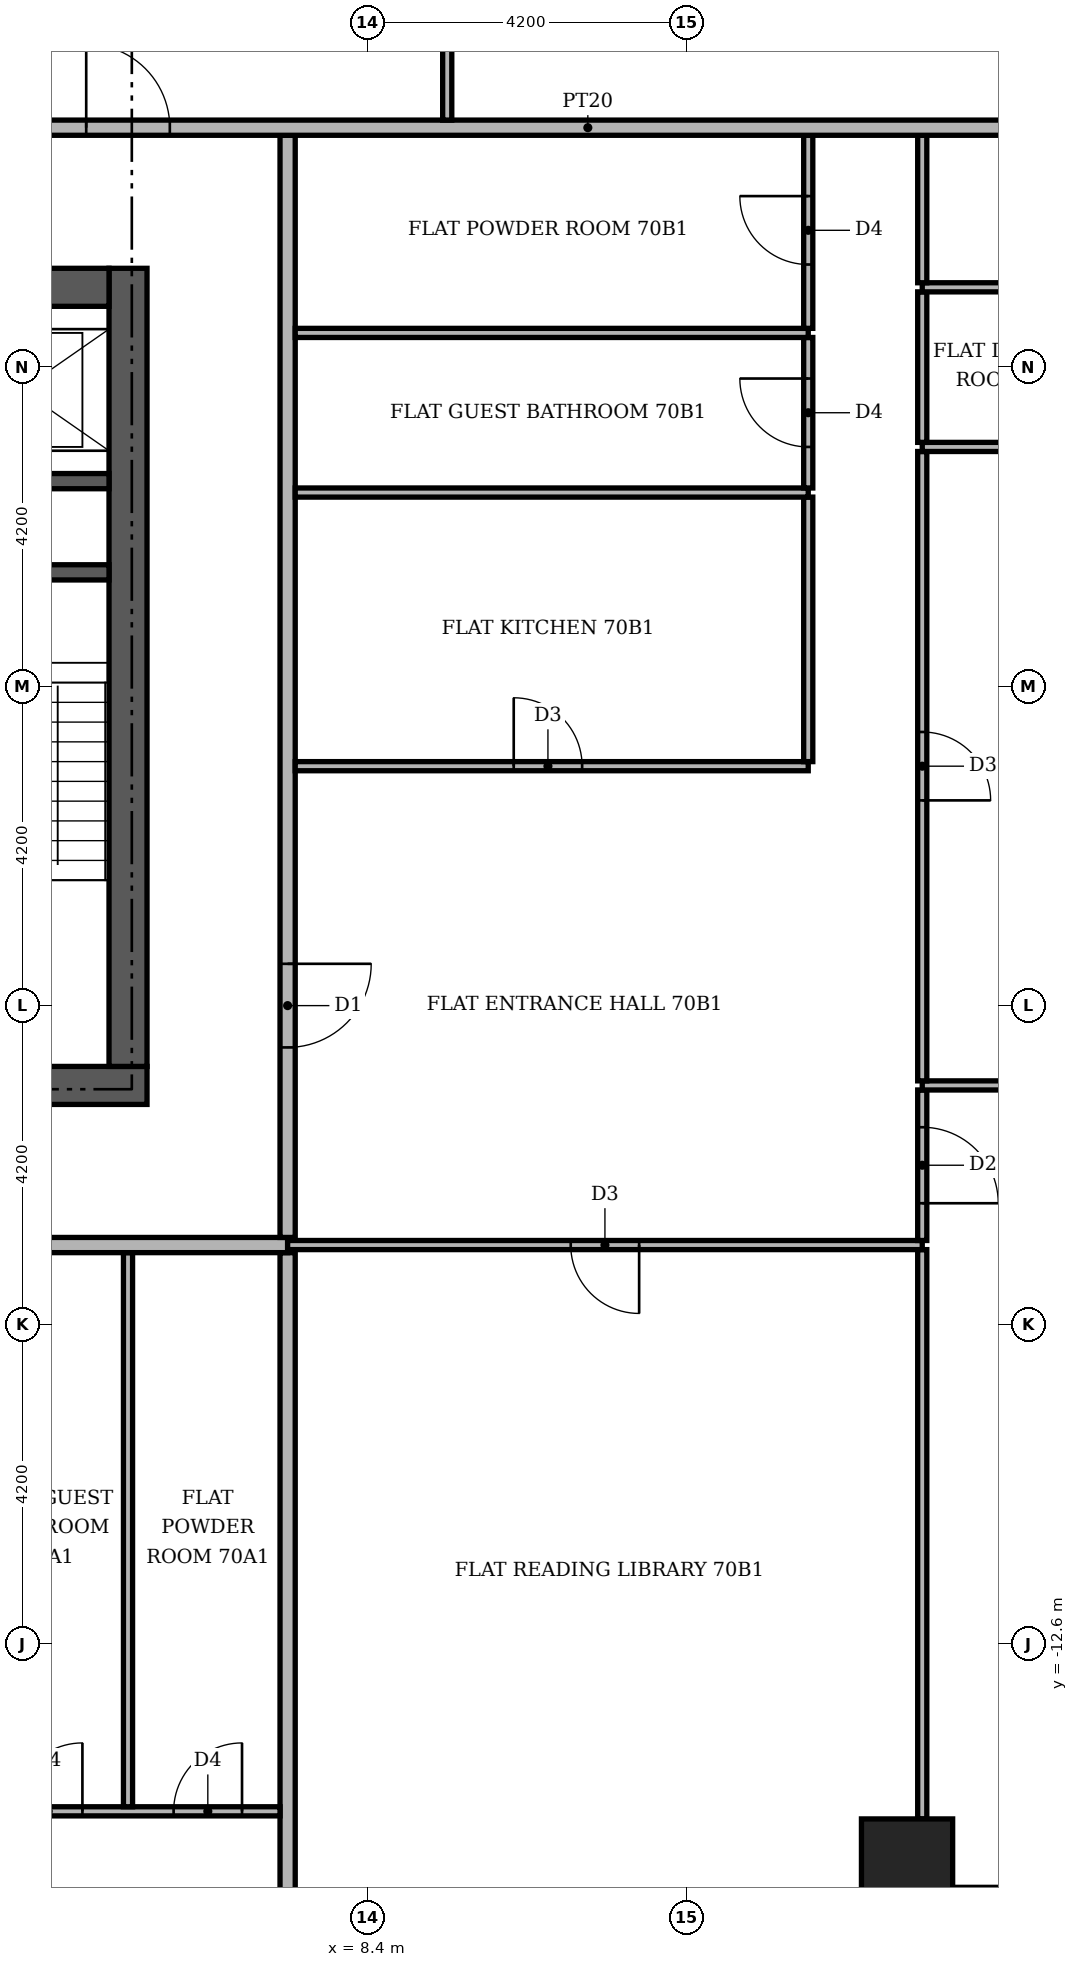
"""IFC4 building model, lengths in metres.
Left out: names, types, materials, properties, quantities, classifications, styles, units other than length and angle.
Written with IfcOpenShell. Run it as: python <this file> out.ifc"""

import sys

from ifc_helpers import new_model, si_unit, direction, frame, frame_2d, origin, origin_2d, place, context, subcontext, project, spatial, rectangle, extrude, element, fill, save


model = new_model("IFC4")
c1 = context("Model", 3, precision=1e-05, world=origin(), true_north=direction((0.0, 1.0)))
c2 = subcontext(c1, "Body", "Model", "MODEL_VIEW")
j1 = project(units=[si_unit("LENGTHUNIT", "METRE"), si_unit("PLANEANGLEUNIT", "RADIAN")], contexts=[c1])
p1 = place(None, origin())
s1 = spatial("IfcSite", under=j1, at=p1, CompositionType="ELEMENT")
p2 = place(p1, origin())
s2 = spatial("IfcBuilding", under=s1, at=p2, CompositionType="ELEMENT")
p3 = place(p2, frame((0.0, 0.0, 292.8)))
s3 = spatial("IfcBuildingStorey", under=s2, at=p3, CompositionType="ELEMENT", Elevation=292.8)
p4 = place(p3, frame((-5.5, -5.25, 0.0), z_axis=(0.0, 0.0, 1.0), x_axis=(1.0, 0.0, 0.0)))
e1 = element("IfcWall", 1, at=p4, inside=s3, PredefinedType="SHEAR", context=c2, shape_type="SweptSolid", body=[
    extrude(rectangle(XDim=11.0, YDim=0.5, at=frame_2d((5.5, 0.0))), origin(), (0.0, 0.0, 1.0), 3.55),
])
p5 = place(p4, frame((4.9, 0.0, 0.0)))
e2 = element("IfcOpeningElement", 2, at=p5, cuts=e1, PredefinedType="OPENING", context=c2, shape_type="SweptSolid", body=[
    extrude(rectangle(XDim=1.2, YDim=2.1, at=frame_2d((0.6, 1.05))), frame((0.0, 0.26, 0.0), z_axis=(0.0, -1.0, 0.0), x_axis=(1.0, 0.0, 0.0)), (0.0, 0.0, 1.0), 0.52),
])
p6 = place(p3, frame((5.25, -5.0, 0.0), z_axis=(0.0, 0.0, 1.0), x_axis=(0.0, 1.0, 0.0)))
e3 = element("IfcWall", 3, at=p6, inside=s3, PredefinedType="SHEAR", context=c2, shape_type="SweptSolid", body=[
    extrude(rectangle(XDim=10.5, YDim=0.5, at=frame_2d((5.25, 0.0))), origin(), (0.0, 0.0, 1.0), 3.55),
])
p7 = place(p3, frame((-5.0, 5.25, 0.0), z_axis=(0.0, 0.0, 1.0), x_axis=(1.0, 0.0, 0.0)))
e4 = element("IfcWall", 4, at=p7, inside=s3, PredefinedType="SHEAR", context=c2, shape_type="SweptSolid", body=[
    extrude(rectangle(XDim=10.0, YDim=0.5, at=frame_2d((5.0, 0.0))), origin(), (0.0, 0.0, 1.0), 3.55),
])
p8 = place(p7, frame((4.4, 0.0, 0.0)))
e5 = element("IfcOpeningElement", 5, at=p8, cuts=e4, PredefinedType="OPENING", context=c2, shape_type="SweptSolid", body=[
    extrude(rectangle(XDim=1.2, YDim=2.1, at=frame_2d((0.6, 1.05))), frame((0.0, 0.26, 0.0), z_axis=(0.0, -1.0, 0.0), x_axis=(1.0, 0.0, 0.0)), (0.0, 0.0, 1.0), 0.52),
])
for number, where, z_axis, x_axis in (
    (6, (2.15, 1.5, 0.0), (0.0, 0.0, 1.0), (1.0, 0.0, 0.0)),
    (7, (2.15, 2.7, 0.0), (0.0, 0.0, 1.0), (1.0, 0.0, 0.0)),
):
    element("IfcWall", number, at=place(p3, frame(where, z_axis=z_axis, x_axis=x_axis)), inside=s3, PredefinedType="SHEAR", context=c2, shape_type="SweptSolid", body=[
        extrude(rectangle(XDim=2.85, YDim=0.2, at=frame_2d((1.425, 0.0))), origin(), (0.0, 0.0, 1.0), 3.55),
    ])
p9 = place(p3, frame((15.5, -15.5, -0.35), z_axis=(0.0, 0.0, 1.0), x_axis=(1.0, 0.0, 0.0)))
e8 = element("IfcColumn", 8, at=p9, inside=s3, PredefinedType="COLUMN", context=c2, shape_type="SweptSolid", body=[
    extrude(rectangle(XDim=1.2, YDim=1.2, at=origin_2d()), origin(), (0.0, 0.0, 1.0), 4.25),
])
p10 = place(p3, frame((7.35, -21.3, 0.0), z_axis=(0.0, 0.0, 1.0), x_axis=(0.0, 1.0, 0.0)))
e9 = element("IfcWall", 9, at=p10, inside=s3, PredefinedType="PARTITIONING", context=c2, shape_type="SweptSolid", body=[
    extrude(rectangle(XDim=13.85, YDim=0.2, at=frame_2d((6.925, 0.0))), origin(), (0.0, 0.0, 1.0), 3.55),
])
p11 = place(p3, frame((15.7, -14.9, 0.0), z_axis=(0.0, 0.0, 1.0), x_axis=(0.0, 1.0, 0.0)))
e10 = element("IfcWall", 10, at=p11, inside=s3, PredefinedType="PARTITIONING", context=c2, shape_type="SweptSolid", body=[
    extrude(rectangle(XDim=7.49, YDim=0.12, at=frame_2d((3.745, 0.0))), origin(), (0.0, 0.0, 1.0), 3.55),
])
p12 = place(p3, frame((-1.05, -14.8, 0.0), z_axis=(0.0, 0.0, 1.0), x_axis=(1.0, 0.0, 0.0)))
e11 = element("IfcWall", 11, at=p12, inside=s3, PredefinedType="PARTITIONING", context=c2, shape_type="SweptSolid", body=[
    extrude(rectangle(XDim=8.3, YDim=0.12, at=frame_2d((4.15, 0.0))), origin(), (0.0, 0.0, 1.0), 3.55),
])
p13 = place(p12, frame((4.8, 0.0, 0.0)))
e12 = element("IfcOpeningElement", 12, at=p13, cuts=e11, PredefinedType="OPENING", context=c2, shape_type="SweptSolid", body=[
    extrude(rectangle(XDim=0.9, YDim=2.1, at=frame_2d((0.45, 1.05))), frame((0.0, 0.07, 0.0), z_axis=(0.0, -1.0, 0.0), x_axis=(1.0, 0.0, 0.0)), (0.0, 0.0, 1.0), 0.14),
])
p14 = place(p12, frame((6.9, 0.0, 0.0)))
e13 = element("IfcOpeningElement", 13, at=p14, cuts=e11, PredefinedType="OPENING", context=c2, shape_type="SweptSolid", body=[
    extrude(rectangle(XDim=0.9, YDim=2.1, at=frame_2d((0.45, 1.05))), frame((0.0, 0.07, 0.0), z_axis=(0.0, -1.0, 0.0), x_axis=(1.0, 0.0, 0.0)), (0.0, 0.0, 1.0), 0.14),
])
p15 = place(p3, frame((5.25, -14.74, 0.0), z_axis=(0.0, 0.0, 1.0), x_axis=(0.0, 1.0, 0.0)))
e14 = element("IfcWall", 14, at=p15, inside=s3, PredefinedType="PARTITIONING", context=c2, shape_type="SweptSolid", body=[
    extrude(rectangle(XDim=7.29, YDim=0.12, at=frame_2d((3.645, 0.0))), origin(), (0.0, 0.0, 1.0), 3.55),
])
p16 = place(p3, frame((-21.3, -7.35, 0.0), z_axis=(0.0, 0.0, 1.0), x_axis=(1.0, 0.0, 0.0)))
e15 = element("IfcWall", 15, at=p16, inside=s3, PredefinedType="PARTITIONING", context=c2, shape_type="SweptSolid", body=[
    extrude(rectangle(XDim=28.65, YDim=0.2, at=frame_2d((14.325, 0.0))), origin(), (0.0, 0.0, 1.0), 3.55),
])
p17 = place(p16, frame((16.55, 0.0, 0.0)))
e16 = element("IfcOpeningElement", 16, at=p17, cuts=e15, PredefinedType="OPENING", context=c2, shape_type="SweptSolid", body=[
    extrude(rectangle(XDim=1.1, YDim=2.4, at=frame_2d((0.55, 1.2))), frame((0.0, 0.11, 0.0), z_axis=(0.0, -1.0, 0.0), x_axis=(1.0, 0.0, 0.0)), (0.0, 0.0, 1.0), 0.22),
])
p18 = place(p3, frame((7.35, -7.35, 0.0), z_axis=(0.0, 0.0, 1.0), x_axis=(1.0, 0.0, 0.0)))
e17 = element("IfcWall", 17, at=p18, inside=s3, PredefinedType="PARTITIONING", context=c2, shape_type="SweptSolid", body=[
    extrude(rectangle(XDim=8.35, YDim=0.12, at=frame_2d((4.175, 0.0))), origin(), (0.0, 0.0, 1.0), 3.55),
])
p19 = place(p18, frame((3.725, 0.0, 0.0)))
e18 = element("IfcOpeningElement", 18, at=p19, cuts=e17, PredefinedType="OPENING", context=c2, shape_type="SweptSolid", body=[
    extrude(rectangle(XDim=0.9, YDim=2.1, at=frame_2d((0.45, 1.05))), frame((0.0, 0.07, 0.0), z_axis=(0.0, -1.0, 0.0), x_axis=(1.0, 0.0, 0.0)), (0.0, 0.0, 1.0), 0.14),
])
p20 = place(p3, frame((15.7, -7.29, 0.0), z_axis=(0.0, 0.0, 1.0), x_axis=(0.0, 1.0, 0.0)))
e19 = element("IfcWall", 19, at=p20, inside=s3, PredefinedType="PARTITIONING", context=c2, shape_type="SweptSolid", body=[
    extrude(rectangle(XDim=1.98, YDim=0.12, at=frame_2d((0.99, 0.0))), origin(), (0.0, 0.0, 1.0), 3.55),
])
p21 = place(p20, frame((0.49, 0.0, 0.0)))
e20 = element("IfcOpeningElement", 20, at=p21, cuts=e19, PredefinedType="OPENING", context=c2, shape_type="SweptSolid", body=[
    extrude(rectangle(XDim=1.0, YDim=2.1, at=frame_2d((0.5, 1.05))), frame((0.0, 0.07, 0.0), z_axis=(0.0, -1.0, 0.0), x_axis=(1.0, 0.0, 0.0)), (0.0, 0.0, 1.0), 0.14),
])
p22 = place(p3, frame((7.35, -7.25, 0.0), z_axis=(0.0, 0.0, 1.0), x_axis=(0.0, 1.0, 0.0)))
e21 = element("IfcWall", 21, at=p22, inside=s3, PredefinedType="PARTITIONING", context=c2, shape_type="SweptSolid", body=[
    extrude(rectangle(XDim=14.5, YDim=0.2, at=frame_2d((7.25, 0.0))), origin(), (0.0, 0.0, 1.0), 3.55),
])
p23 = place(p22, frame((2.5, 0.0, 0.0)))
e22 = element("IfcOpeningElement", 22, at=p23, cuts=e21, PredefinedType="OPENING", context=c2, shape_type="SweptSolid", body=[
    extrude(rectangle(XDim=1.1, YDim=2.4, at=frame_2d((0.55, 1.2))), frame((0.0, 0.11, 0.0), z_axis=(0.0, -1.0, 0.0), x_axis=(1.0, 0.0, 0.0)), (0.0, 0.0, 1.0), 0.22),
])
p24 = place(p3, frame((15.7, -5.25, 0.0), z_axis=(0.0, 0.0, 1.0), x_axis=(1.0, 0.0, 0.0)))
e23 = element("IfcWall", 23, at=p24, inside=s3, PredefinedType="PARTITIONING", context=c2, shape_type="SweptSolid", body=[
    extrude(rectangle(XDim=5.6, YDim=0.12, at=frame_2d((2.8, 0.0))), origin(), (0.0, 0.0, 1.0), 3.55),
])
p25 = place(p3, frame((15.7, -5.19, 0.0), z_axis=(0.0, 0.0, 1.0), x_axis=(0.0, 1.0, 0.0)))
e24 = element("IfcWall", 24, at=p25, inside=s3, PredefinedType="PARTITIONING", context=c2, shape_type="SweptSolid", body=[
    extrude(rectangle(XDim=8.28, YDim=0.12, at=frame_2d((4.14, 0.0))), origin(), (0.0, 0.0, 1.0), 3.55),
])
p26 = place(p25, frame((3.69, 0.0, 0.0)))
e25 = element("IfcOpeningElement", 25, at=p26, cuts=e24, PredefinedType="OPENING", context=c2, shape_type="SweptSolid", body=[
    extrude(rectangle(XDim=0.9, YDim=2.1, at=frame_2d((0.45, 1.05))), frame((0.0, 0.07, 0.0), z_axis=(0.0, -1.0, 0.0), x_axis=(1.0, 0.0, 0.0)), (0.0, 0.0, 1.0), 0.14),
])
p27 = place(p3, frame((7.45, -1.05, 0.0), z_axis=(0.0, 0.0, 1.0), x_axis=(1.0, 0.0, 0.0)))
e26 = element("IfcWall", 26, at=p27, inside=s3, PredefinedType="PARTITIONING", context=c2, shape_type="SweptSolid", body=[
    extrude(rectangle(XDim=6.75, YDim=0.12, at=frame_2d((3.375, 0.0))), origin(), (0.0, 0.0, 1.0), 3.55),
])
p28 = place(p27, frame((2.875, 0.0, 0.0)))
e27 = element("IfcOpeningElement", 27, at=p28, cuts=e26, PredefinedType="OPENING", context=c2, shape_type="SweptSolid", body=[
    extrude(rectangle(XDim=0.9, YDim=2.1, at=frame_2d((0.45, 1.05))), frame((0.0, 0.07, 0.0), z_axis=(0.0, -1.0, 0.0), x_axis=(1.0, 0.0, 0.0)), (0.0, 0.0, 1.0), 0.14),
])
p29 = place(p3, frame((14.2, -0.99, 0.0), z_axis=(0.0, 0.0, 1.0), x_axis=(0.0, 1.0, 0.0)))
e28 = element("IfcWall", 28, at=p29, inside=s3, PredefinedType="PARTITIONING", context=c2, shape_type="SweptSolid", body=[
    extrude(rectangle(XDim=3.48, YDim=0.12, at=frame_2d((1.74, 0.0))), origin(), (0.0, 0.0, 1.0), 3.55),
])
p30 = place(p3, frame((7.45, 2.55, 0.0), z_axis=(0.0, 0.0, 1.0), x_axis=(1.0, 0.0, 0.0)))
e29 = element("IfcWall", 29, at=p30, inside=s3, PredefinedType="PARTITIONING", context=c2, shape_type="SweptSolid", body=[
    extrude(rectangle(XDim=6.75, YDim=0.12, at=frame_2d((3.375, 0.0))), origin(), (0.0, 0.0, 1.0), 3.55),
])
p31 = place(p3, frame((14.2, 2.61, 0.0), z_axis=(0.0, 0.0, 1.0), x_axis=(0.0, 1.0, 0.0)))
e30 = element("IfcWall", 30, at=p31, inside=s3, PredefinedType="PARTITIONING", context=c2, shape_type="SweptSolid", body=[
    extrude(rectangle(XDim=1.98, YDim=0.12, at=frame_2d((0.99, 0.0))), origin(), (0.0, 0.0, 1.0), 3.55),
])
p32 = place(p31, frame((0.54, 0.0, 0.0)))
e31 = element("IfcOpeningElement", 31, at=p32, cuts=e30, PredefinedType="OPENING", context=c2, shape_type="SweptSolid", body=[
    extrude(rectangle(XDim=0.9, YDim=2.1, at=frame_2d((0.45, 1.05))), frame((0.0, 0.07, 0.0), z_axis=(0.0, -1.0, 0.0), x_axis=(1.0, 0.0, 0.0)), (0.0, 0.0, 1.0), 0.14),
])
p33 = place(p3, frame((15.7, 3.15, 0.0), z_axis=(0.0, 0.0, 1.0), x_axis=(1.0, 0.0, 0.0)))
e32 = element("IfcWall", 32, at=p33, inside=s3, PredefinedType="PARTITIONING", context=c2, shape_type="SweptSolid", body=[
    extrude(rectangle(XDim=5.6, YDim=0.12, at=frame_2d((2.8, 0.0))), origin(), (0.0, 0.0, 1.0), 3.55),
])
p34 = place(p33, frame((2.5, 0.0, 0.0)))
e33 = element("IfcOpeningElement", 33, at=p34, cuts=e32, PredefinedType="OPENING", context=c2, shape_type="SweptSolid", body=[
    extrude(rectangle(XDim=0.9, YDim=2.1, at=frame_2d((0.45, 1.05))), frame((0.0, 0.07, 0.0), z_axis=(0.0, -1.0, 0.0), x_axis=(1.0, 0.0, 0.0)), (0.0, 0.0, 1.0), 0.14),
])
p35 = place(p3, frame((15.7, 3.21, 0.0), z_axis=(0.0, 0.0, 1.0), x_axis=(0.0, 1.0, 0.0)))
e34 = element("IfcWall", 34, at=p35, inside=s3, PredefinedType="PARTITIONING", context=c2, shape_type="SweptSolid", body=[
    extrude(rectangle(XDim=1.98, YDim=0.12, at=frame_2d((0.99, 0.0))), origin(), (0.0, 0.0, 1.0), 3.55),
])
p36 = place(p3, frame((7.45, 4.65, 0.0), z_axis=(0.0, 0.0, 1.0), x_axis=(1.0, 0.0, 0.0)))
e35 = element("IfcWall", 35, at=p36, inside=s3, PredefinedType="PARTITIONING", context=c2, shape_type="SweptSolid", body=[
    extrude(rectangle(XDim=6.75, YDim=0.12, at=frame_2d((3.375, 0.0))), origin(), (0.0, 0.0, 1.0), 3.55),
])
p37 = place(p3, frame((14.2, 4.71, 0.0), z_axis=(0.0, 0.0, 1.0), x_axis=(0.0, 1.0, 0.0)))
e36 = element("IfcWall", 36, at=p37, inside=s3, PredefinedType="PARTITIONING", context=c2, shape_type="SweptSolid", body=[
    extrude(rectangle(XDim=2.54, YDim=0.12, at=frame_2d((1.27, 0.0))), origin(), (0.0, 0.0, 1.0), 3.55),
])
p38 = place(p37, frame((0.84, 0.0, 0.0)))
e37 = element("IfcOpeningElement", 37, at=p38, cuts=e36, PredefinedType="OPENING", context=c2, shape_type="SweptSolid", body=[
    extrude(rectangle(XDim=0.9, YDim=2.1, at=frame_2d((0.45, 1.05))), frame((0.0, 0.07, 0.0), z_axis=(0.0, -1.0, 0.0), x_axis=(1.0, 0.0, 0.0)), (0.0, 0.0, 1.0), 0.14),
])
p39 = place(p3, frame((15.7, 5.25, 0.0), z_axis=(0.0, 0.0, 1.0), x_axis=(1.0, 0.0, 0.0)))
e38 = element("IfcWall", 38, at=p39, inside=s3, PredefinedType="PARTITIONING", context=c2, shape_type="SweptSolid", body=[
    extrude(rectangle(XDim=5.6, YDim=0.12, at=frame_2d((2.8, 0.0))), origin(), (0.0, 0.0, 1.0), 3.55),
])
p40 = place(p39, frame((2.5, 0.0, 0.0)))
e39 = element("IfcOpeningElement", 39, at=p40, cuts=e38, PredefinedType="OPENING", context=c2, shape_type="SweptSolid", body=[
    extrude(rectangle(XDim=0.9, YDim=2.1, at=frame_2d((0.45, 1.05))), frame((0.0, 0.07, 0.0), z_axis=(0.0, -1.0, 0.0), x_axis=(1.0, 0.0, 0.0)), (0.0, 0.0, 1.0), 0.14),
])
p41 = place(p3, frame((15.7, 5.31, 0.0), z_axis=(0.0, 0.0, 1.0), x_axis=(0.0, 1.0, 0.0)))
e40 = element("IfcWall", 40, at=p41, inside=s3, PredefinedType="PARTITIONING", context=c2, shape_type="SweptSolid", body=[
    extrude(rectangle(XDim=1.94, YDim=0.12, at=frame_2d((0.97, 0.0))), origin(), (0.0, 0.0, 1.0), 3.55),
])
p42 = place(p3, frame((1.3, 7.35, 0.0), z_axis=(0.0, 0.0, 1.0), x_axis=(1.0, 0.0, 0.0)))
e41 = element("IfcWall", 41, at=p42, inside=s3, PredefinedType="PARTITIONING", context=c2, shape_type="SweptSolid", body=[
    extrude(rectangle(XDim=20.0, YDim=0.2, at=frame_2d((10.0, 0.0))), origin(), (0.0, 0.0, 1.0), 3.55),
])
p43 = place(p42, frame((3.4, 0.0, 0.0)))
e42 = element("IfcOpeningElement", 42, at=p43, cuts=e41, PredefinedType="OPENING", context=c2, shape_type="SweptSolid", body=[
    extrude(rectangle(XDim=1.1, YDim=2.4, at=frame_2d((0.55, 1.2))), frame((0.0, 0.11, 0.0), z_axis=(0.0, -1.0, 0.0), x_axis=(1.0, 0.0, 0.0)), (0.0, 0.0, 1.0), 0.22),
])
p44 = place(p3, frame((9.45, 7.45, 0.0), z_axis=(0.0, 0.0, 1.0), x_axis=(0.0, 1.0, 0.0)))
e43 = element("IfcWall", 43, at=p44, inside=s3, PredefinedType="PARTITIONING", context=c2, shape_type="SweptSolid", body=[
    extrude(rectangle(XDim=9.09, YDim=0.12, at=frame_2d((4.545, 0.0))), origin(), (0.0, 0.0, 1.0), 3.55),
])
p45 = place(p44, frame((4.075, 0.0, 0.0)))
e44 = element("IfcOpeningElement", 44, at=p45, cuts=e43, PredefinedType="OPENING", context=c2, shape_type="SweptSolid", body=[
    extrude(rectangle(XDim=0.9, YDim=2.1, at=frame_2d((0.45, 1.05))), frame((0.0, 0.07, 0.0), z_axis=(0.0, -1.0, 0.0), x_axis=(1.0, 0.0, 0.0)), (0.0, 0.0, 1.0), 0.14),
])
p46 = place(p13, origin())
e45 = element("IfcDoor", 45, at=p46, inside=s3, OperationType="SINGLE_SWING_RIGHT", PredefinedType="DOOR", context=c2, shape_type="SweptSolid", body=[
    extrude(rectangle(XDim=0.9, YDim=2.1, at=frame_2d((0.45, 1.05))), frame((0.0, 0.025, 0.0), z_axis=(0.0, -1.0, 0.0), x_axis=(1.0, 0.0, 0.0)), (0.0, 0.0, 1.0), 0.05),
])
fill(e12, e45)
p47 = place(p14, origin())
e46 = element("IfcDoor", 46, at=p47, inside=s3, OperationType="SINGLE_SWING_RIGHT", PredefinedType="DOOR", context=c2, shape_type="SweptSolid", body=[
    extrude(rectangle(XDim=0.9, YDim=2.1, at=frame_2d((0.45, 1.05))), frame((0.0, 0.025, 0.0), z_axis=(0.0, -1.0, 0.0), x_axis=(1.0, 0.0, 0.0)), (0.0, 0.0, 1.0), 0.05),
])
fill(e13, e46)
p48 = place(p23, frame((1.1, 0.0, 0.0), z_axis=(0.0, 0.0, 1.0), x_axis=(-1.0, 0.0, 0.0)))
e47 = element("IfcDoor", 47, at=p48, inside=s3, OperationType="SINGLE_SWING_RIGHT", PredefinedType="DOOR", context=c2, shape_type="SweptSolid", body=[
    extrude(rectangle(XDim=1.1, YDim=2.4, at=frame_2d((0.55, 1.2))), frame((0.0, 0.025, 0.0), z_axis=(0.0, -1.0, 0.0), x_axis=(1.0, 0.0, 0.0)), (0.0, 0.0, 1.0), 0.05),
])
fill(e22, e47)
p49 = place(p19, frame((0.9, 0.0, 0.0), z_axis=(0.0, 0.0, 1.0), x_axis=(-1.0, 0.0, 0.0)))
e48 = element("IfcDoor", 48, at=p49, inside=s3, OperationType="SINGLE_SWING_RIGHT", PredefinedType="DOOR", context=c2, shape_type="SweptSolid", body=[
    extrude(rectangle(XDim=0.9, YDim=2.1, at=frame_2d((0.45, 1.05))), frame((0.0, 0.025, 0.0), z_axis=(0.0, -1.0, 0.0), x_axis=(1.0, 0.0, 0.0)), (0.0, 0.0, 1.0), 0.05),
])
fill(e18, e48)
p50 = place(p28, origin())
e49 = element("IfcDoor", 49, at=p50, inside=s3, OperationType="SINGLE_SWING_LEFT", PredefinedType="DOOR", context=c2, shape_type="SweptSolid", body=[
    extrude(rectangle(XDim=0.9, YDim=2.1, at=frame_2d((0.45, 1.05))), frame((0.0, 0.025, 0.0), z_axis=(0.0, -1.0, 0.0), x_axis=(1.0, 0.0, 0.0)), (0.0, 0.0, 1.0), 0.05),
])
fill(e27, e49)
p51 = place(p32, origin())
e50 = element("IfcDoor", 50, at=p51, inside=s3, OperationType="SINGLE_SWING_RIGHT", PredefinedType="DOOR", context=c2, shape_type="SweptSolid", body=[
    extrude(rectangle(XDim=0.9, YDim=2.1, at=frame_2d((0.45, 1.05))), frame((0.0, 0.025, 0.0), z_axis=(0.0, -1.0, 0.0), x_axis=(1.0, 0.0, 0.0)), (0.0, 0.0, 1.0), 0.05),
])
fill(e31, e50)
p52 = place(p38, origin())
e51 = element("IfcDoor", 51, at=p52, inside=s3, OperationType="SINGLE_SWING_RIGHT", PredefinedType="DOOR", context=c2, shape_type="SweptSolid", body=[
    extrude(rectangle(XDim=0.9, YDim=2.1, at=frame_2d((0.45, 1.05))), frame((0.0, 0.025, 0.0), z_axis=(0.0, -1.0, 0.0), x_axis=(1.0, 0.0, 0.0)), (0.0, 0.0, 1.0), 0.05),
])
fill(e37, e51)
p53 = place(p21, frame((1.0, 0.0, 0.0), z_axis=(0.0, 0.0, 1.0), x_axis=(-1.0, 0.0, 0.0)))
e52 = element("IfcDoor", 52, at=p53, inside=s3, OperationType="SINGLE_SWING_LEFT", PredefinedType="DOOR", context=c2, shape_type="SweptSolid", body=[
    extrude(rectangle(XDim=1.0, YDim=2.1, at=frame_2d((0.5, 1.05))), frame((0.0, 0.025, 0.0), z_axis=(0.0, -1.0, 0.0), x_axis=(1.0, 0.0, 0.0)), (0.0, 0.0, 1.0), 0.05),
])
fill(e20, e52)
p54 = place(p26, frame((0.9, 0.0, 0.0), z_axis=(0.0, 0.0, 1.0), x_axis=(-1.0, 0.0, 0.0)))
e53 = element("IfcDoor", 53, at=p54, inside=s3, OperationType="SINGLE_SWING_LEFT", PredefinedType="DOOR", context=c2, shape_type="SweptSolid", body=[
    extrude(rectangle(XDim=0.9, YDim=2.1, at=frame_2d((0.45, 1.05))), frame((0.0, 0.025, 0.0), z_axis=(0.0, -1.0, 0.0), x_axis=(1.0, 0.0, 0.0)), (0.0, 0.0, 1.0), 0.05),
])
fill(e25, e53)
p55 = place(p43, origin())
e54 = element("IfcDoor", 54, at=p55, inside=s3, OperationType="SINGLE_SWING_LEFT", PredefinedType="DOOR", context=c2, shape_type="SweptSolid", body=[
    extrude(rectangle(XDim=1.1, YDim=2.4, at=frame_2d((0.55, 1.2))), frame((0.0, 0.025, 0.0), z_axis=(0.0, -1.0, 0.0), x_axis=(1.0, 0.0, 0.0)), (0.0, 0.0, 1.0), 0.05),
])
fill(e42, e54)
save(model, sys.argv[1])
